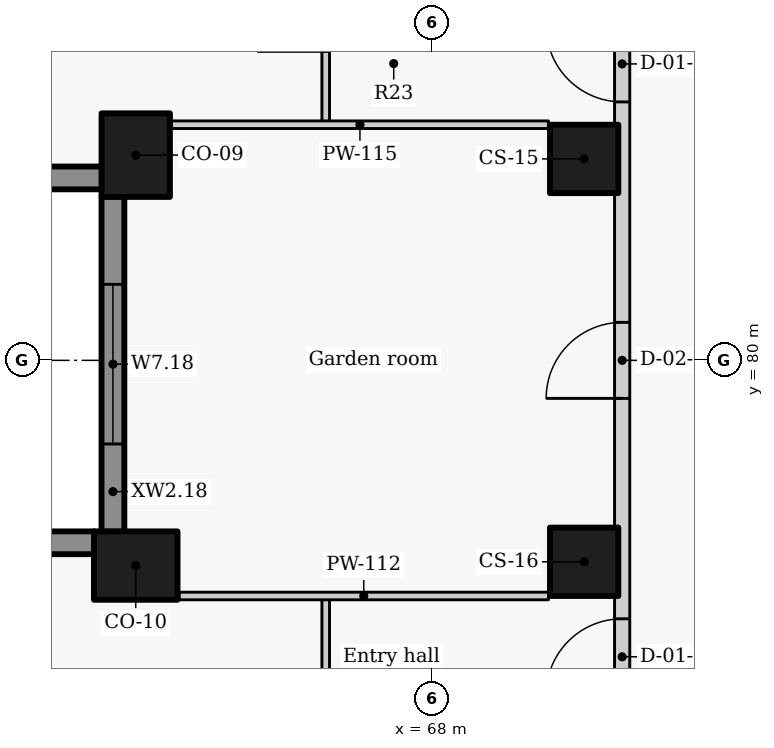
"""IFC4 building model, lengths in metres.
Left out: names, types, materials, properties, quantities, classifications, styles, units other than length and angle.
Written with IfcOpenShell. Run it as: python <this file> out.ifc"""

import sys

from ifc_helpers import new_model, si_unit, direction, frame, frame_2d, origin, origin_2d, place, context, subcontext, project, spatial, rectangle, extrude, element, fill, save


model = new_model("IFC4")
c1 = context("Model", 3, precision=1e-05, world=origin(), true_north=direction((0.0, 1.0)))
c2 = subcontext(c1, "Body", "Model", "MODEL_VIEW")
j1 = project(units=[si_unit("LENGTHUNIT", "METRE"), si_unit("PLANEANGLEUNIT", "RADIAN")], contexts=[c1])
p1 = place(None, origin())
s1 = spatial("IfcSite", under=j1, at=p1, CompositionType="ELEMENT")
p2 = place(p1, origin())
s2 = spatial("IfcBuilding", under=s1, at=p2, CompositionType="ELEMENT")
p3 = place(p2, frame((0.0, 0.0, 229.5)))
s3 = spatial("IfcBuildingStorey", under=s2, at=p3, CompositionType="ELEMENT", Elevation=229.5)
for number, where, z_axis, x_axis in (
    (1, (64.101, 82.7, 0.0), (0.0, 0.0, 1.0), (0.0, -1.0, 0.0)),
    (2, (64.101, 77.3, 0.0), (0.0, 0.0, 1.0), (-1.0, 0.0, 0.0)),
):
    element("IfcColumn", number, at=place(p3, frame(where, z_axis=z_axis, x_axis=x_axis)), inside=s3, PredefinedType="COLUMN", context=c2, shape_type="SweptSolid", body=[
        extrude(rectangle(XDim=1.1, YDim=0.9, at=origin_2d()), origin(), (0.0, 0.0, 1.0), 3.3),
    ])
for number, where, z_axis, x_axis in (
    (3, (70.0, 82.65, 0.0), (0.0, 0.0, 1.0), (0.0, -1.0, 0.0)),
    (4, (70.0, 77.35, 0.0), (0.0, 0.0, 1.0), (0.0, -1.0, 0.0)),
):
    element("IfcColumn", number, at=place(p3, frame(where, z_axis=z_axis, x_axis=x_axis)), inside=s3, PredefinedType="COLUMN", context=c2, shape_type="SweptSolid", body=[
        extrude(rectangle(XDim=0.9, YDim=0.9, at=origin_2d()), origin(), (0.0, 0.0, 1.0), 3.3),
    ])
p4 = place(p3, frame((59.282, 82.4, 0.0), z_axis=(0.0, 0.0, 1.0), x_axis=(1.0, 0.0, 0.0)))
e5 = element("IfcWall", 5, at=p4, inside=s3, PredefinedType="SOLIDWALL", context=c2, shape_type="SweptSolid", body=[
    extrude(rectangle(XDim=4.373, YDim=0.3, at=frame_2d((2.186, 0.0))), origin(), (0.0, 0.0, 1.0), 2.425),
])
p5 = place(p3, frame((63.801, 82.154, 0.0), z_axis=(0.0, 0.0, 1.0), x_axis=(0.0, -1.0, 0.0)))
e6 = element("IfcWall", 6, at=p5, inside=s3, PredefinedType="SOLIDWALL", context=c2, shape_type="SweptSolid", body=[
    extrude(rectangle(XDim=4.408, YDim=0.3, at=frame_2d((2.204, 0.0))), origin(), (0.0, 0.0, 1.0), 2.425),
])
p6 = place(p5, frame((1.154, 0.0, 0.9)))
e7 = element("IfcOpeningElement", 7, at=p6, cuts=e6, PredefinedType="OPENING", context=c2, shape_type="SweptSolid", body=[
    extrude(rectangle(XDim=2.1, YDim=1.1, at=frame_2d((1.05, 0.55))), frame((0.0, 0.16, 0.0), z_axis=(0.0, -1.0, 0.0), x_axis=(1.0, 0.0, 0.0)), (0.0, 0.0, 1.0), 0.32),
])
p7 = place(p3, frame((63.554, 77.6, 0.0), z_axis=(0.0, 0.0, 1.0), x_axis=(-1.0, 0.0, 0.0)))
e8 = element("IfcWall", 8, at=p7, inside=s3, PredefinedType="SOLIDWALL", context=c2, shape_type="SweptSolid", body=[
    extrude(rectangle(XDim=4.272, YDim=0.3, at=frame_2d((2.136, 0.0))), origin(), (0.0, 0.0, 1.0), 2.425),
])
p8 = place(p3, frame((70.5, 72.577, 0.0), z_axis=(0.0, 0.0, 1.0), x_axis=(0.0, 1.0, 0.0)))
e9 = element("IfcWall", 9, at=p8, inside=s3, PredefinedType="PARTITIONING", context=c2, shape_type="SweptSolid", body=[
    extrude(rectangle(XDim=20.051, YDim=0.2, at=frame_2d((10.025, 0.0))), origin(), (0.0, 0.0, 1.0), 3.025),
])
p9 = place(p8, frame((3.023, 0.0, 0.0)))
e10 = element("IfcOpeningElement", 10, at=p9, cuts=e9, PredefinedType="OPENING", context=c2, shape_type="SweptSolid", body=[
    extrude(rectangle(XDim=1.0, YDim=2.1, at=frame_2d((0.5, 1.05))), frame((0.0, 0.11, 0.0), z_axis=(0.0, -1.0, 0.0), x_axis=(1.0, 0.0, 0.0)), (0.0, 0.0, 1.0), 0.22),
])
p10 = place(p8, frame((6.923, 0.0, 0.0)))
e11 = element("IfcOpeningElement", 11, at=p10, cuts=e9, PredefinedType="OPENING", context=c2, shape_type="SweptSolid", body=[
    extrude(rectangle(XDim=1.0, YDim=2.1, at=frame_2d((0.5, 1.05))), frame((0.0, 0.11, 0.0), z_axis=(0.0, -1.0, 0.0), x_axis=(1.0, 0.0, 0.0)), (0.0, 0.0, 1.0), 0.22),
])
p11 = place(p8, frame((10.823, 0.0, 0.0)))
e12 = element("IfcOpeningElement", 12, at=p11, cuts=e9, PredefinedType="OPENING", context=c2, shape_type="SweptSolid", body=[
    extrude(rectangle(XDim=1.0, YDim=2.1, at=frame_2d((0.5, 1.05))), frame((0.0, 0.11, 0.0), z_axis=(0.0, -1.0, 0.0), x_axis=(1.0, 0.0, 0.0)), (0.0, 0.0, 1.0), 0.22),
])
p12 = place(p3, frame((66.6, 66.1, 0.0), z_axis=(0.0, 0.0, 1.0), x_axis=(0.0, 1.0, 0.0)))
e13 = element("IfcWall", 13, at=p12, inside=s3, PredefinedType="PARTITIONING", context=c2, shape_type="SweptSolid", body=[
    extrude(rectangle(XDim=10.8, YDim=0.1, at=frame_2d((5.4, 0.0))), origin(), (0.0, 0.0, 1.0), 3.025),
])
p13 = place(p12, frame((1.118, 0.0, 0.0)))
e14 = element("IfcOpeningElement", 14, at=p13, cuts=e13, PredefinedType="OPENING", context=c2, shape_type="SweptSolid", body=[
    extrude(rectangle(XDim=0.9, YDim=2.1, at=frame_2d((0.45, 1.05))), frame((0.0, 0.06, 0.0), z_axis=(0.0, -1.0, 0.0), x_axis=(1.0, 0.0, 0.0)), (0.0, 0.0, 1.0), 0.12),
])
p14 = place(p12, frame((4.253, 0.0, 0.0)))
e15 = element("IfcOpeningElement", 15, at=p14, cuts=e13, PredefinedType="OPENING", context=c2, shape_type="SweptSolid", body=[
    extrude(rectangle(XDim=0.9, YDim=2.1, at=frame_2d((0.45, 1.05))), frame((0.0, 0.06, 0.0), z_axis=(0.0, -1.0, 0.0), x_axis=(1.0, 0.0, 0.0)), (0.0, 0.0, 1.0), 0.12),
])
p15 = place(p12, frame((8.086, 0.0, 0.0)))
e16 = element("IfcOpeningElement", 16, at=p15, cuts=e13, PredefinedType="OPENING", context=c2, shape_type="SweptSolid", body=[
    extrude(rectangle(XDim=0.9, YDim=2.1, at=frame_2d((0.45, 1.05))), frame((0.0, 0.06, 0.0), z_axis=(0.0, -1.0, 0.0), x_axis=(1.0, 0.0, 0.0)), (0.0, 0.0, 1.0), 0.12),
])
p16 = place(p3, frame((66.6, 83.1, 0.0), z_axis=(0.0, 0.0, 1.0), x_axis=(0.0, 1.0, 0.0)))
e17 = element("IfcWall", 17, at=p16, inside=s3, PredefinedType="PARTITIONING", context=c2, shape_type="SweptSolid", body=[
    extrude(rectangle(XDim=9.75, YDim=0.1, at=frame_2d((4.875, 0.0))), origin(), (0.0, 0.0, 1.0), 3.025),
])
p17 = place(p16, frame((0.965, 0.0, 0.0)))
e18 = element("IfcOpeningElement", 18, at=p17, cuts=e17, PredefinedType="OPENING", context=c2, shape_type="SweptSolid", body=[
    extrude(rectangle(XDim=0.9, YDim=2.1, at=frame_2d((0.45, 1.05))), frame((0.0, 0.06, 0.0), z_axis=(0.0, -1.0, 0.0), x_axis=(1.0, 0.0, 0.0)), (0.0, 0.0, 1.0), 0.12),
])
p18 = place(p16, frame((4.425, 0.0, 0.0)))
e19 = element("IfcOpeningElement", 19, at=p18, cuts=e17, PredefinedType="OPENING", context=c2, shape_type="SweptSolid", body=[
    extrude(rectangle(XDim=0.9, YDim=2.1, at=frame_2d((0.45, 1.05))), frame((0.0, 0.06, 0.0), z_axis=(0.0, -1.0, 0.0), x_axis=(1.0, 0.0, 0.0)), (0.0, 0.0, 1.0), 0.12),
])
p19 = place(p16, frame((7.885, 0.0, 0.0)))
e20 = element("IfcOpeningElement", 20, at=p19, cuts=e17, PredefinedType="OPENING", context=c2, shape_type="SweptSolid", body=[
    extrude(rectangle(XDim=0.9, YDim=2.1, at=frame_2d((0.45, 1.05))), frame((0.0, 0.06, 0.0), z_axis=(0.0, -1.0, 0.0), x_axis=(1.0, 0.0, 0.0)), (0.0, 0.0, 1.0), 0.12),
])
p20 = place(p3, frame((64.67, 76.9, 0.0), z_axis=(0.0, 0.0, 1.0), x_axis=(1.0, 0.0, 0.0)))
e21 = element("IfcWall", 21, at=p20, inside=s3, PredefinedType="PARTITIONING", context=c2, shape_type="SweptSolid", body=[
    extrude(rectangle(XDim=4.86, YDim=0.1, at=frame_2d((2.43, 0.0))), origin(), (0.0, 0.0, 1.0), 3.025),
])
p21 = place(p3, frame((64.571, 83.1, 0.0), z_axis=(0.0, 0.0, 1.0), x_axis=(1.0, 0.0, 0.0)))
e22 = element("IfcWall", 22, at=p21, inside=s3, PredefinedType="PARTITIONING", context=c2, shape_type="SweptSolid", body=[
    extrude(rectangle(XDim=4.959, YDim=0.1, at=frame_2d((2.48, 0.0))), origin(), (0.0, 0.0, 1.0), 3.025),
])
p22 = place(p6, origin())
e23 = element("IfcWindow", 23, at=p22, inside=s3, PartitioningType="SINGLE_PANEL", PredefinedType="WINDOW", context=c2, shape_type="SweptSolid", body=[
    extrude(rectangle(XDim=2.1, YDim=1.1, at=frame_2d((1.05, 0.55))), frame((0.0, 0.03, 0.0), z_axis=(0.0, -1.0, 0.0), x_axis=(1.0, 0.0, 0.0)), (0.0, 0.0, 1.0), 0.06),
])
fill(e7, e23)
p23 = place(p9, origin())
e24 = element("IfcDoor", 24, at=p23, inside=s3, OperationType="SINGLE_SWING_LEFT", PredefinedType="DOOR", context=c2, shape_type="SweptSolid", body=[
    extrude(rectangle(XDim=1.0, YDim=2.1, at=frame_2d((0.5, 1.05))), frame((0.0, 0.025, 0.0), z_axis=(0.0, -1.0, 0.0), x_axis=(1.0, 0.0, 0.0)), (0.0, 0.0, 1.0), 0.05),
])
fill(e10, e24)
p24 = place(p10, origin())
e25 = element("IfcDoor", 25, at=p24, inside=s3, OperationType="SINGLE_SWING_LEFT", PredefinedType="DOOR", context=c2, shape_type="SweptSolid", body=[
    extrude(rectangle(XDim=1.0, YDim=2.1, at=frame_2d((0.5, 1.05))), frame((0.0, 0.025, 0.0), z_axis=(0.0, -1.0, 0.0), x_axis=(1.0, 0.0, 0.0)), (0.0, 0.0, 1.0), 0.05),
])
fill(e11, e25)
p25 = place(p11, origin())
e26 = element("IfcDoor", 26, at=p25, inside=s3, OperationType="SINGLE_SWING_RIGHT", PredefinedType="DOOR", context=c2, shape_type="SweptSolid", body=[
    extrude(rectangle(XDim=1.0, YDim=2.1, at=frame_2d((0.5, 1.05))), frame((0.0, 0.025, 0.0), z_axis=(0.0, -1.0, 0.0), x_axis=(1.0, 0.0, 0.0)), (0.0, 0.0, 1.0), 0.05),
])
fill(e12, e26)
save(model, sys.argv[1])
